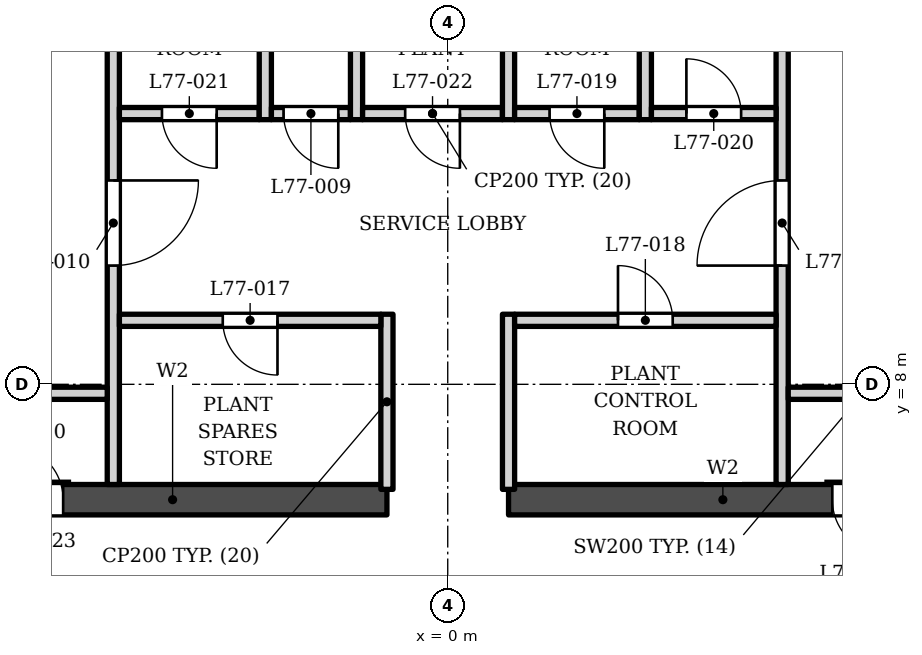
"""IFC4 building model, lengths in metres.
Left out: names, types, materials, properties, quantities, classifications, styles, units other than length and angle.
Written with IfcOpenShell. Run it as: python <this file> out.ifc"""

import sys

from ifc_helpers import new_model, si_unit, direction, frame, frame_2d, origin, place, context, subcontext, project, spatial, rectangle, extrude, element, fill, save


model = new_model("IFC4")
c1 = context("Model", 3, precision=1e-05, world=origin(), true_north=direction((0.0, 1.0)))
c2 = subcontext(c1, "Body", "Model", "MODEL_VIEW")
j1 = project(units=[si_unit("LENGTHUNIT", "METRE"), si_unit("PLANEANGLEUNIT", "RADIAN")], contexts=[c1])
p1 = place(None, origin())
s1 = spatial("IfcSite", under=j1, at=p1, CompositionType="ELEMENT")
p2 = place(p1, origin())
s2 = spatial("IfcBuilding", under=s1, at=p2, CompositionType="ELEMENT")
p3 = place(p2, frame((0.0, 0.0, 330.5)))
s3 = spatial("IfcBuildingStorey", under=s2, at=p3, CompositionType="ELEMENT", Elevation=330.5)
p4 = place(p3, frame((-8.05, 6.103, 0.0), z_axis=(0.0, 0.0, 1.0), x_axis=(1.0, 0.0, 0.0)))
e1 = element("IfcWall", 1, at=p4, inside=s3, PredefinedType="SHEAR", context=c2, shape_type="SweptSolid", body=[
    extrude(rectangle(XDim=7.05, YDim=0.5, at=frame_2d((3.525, 0.0))), origin(), (0.0, 0.0, 1.0), 5.0),
])
p5 = place(p4, frame((0.825, 0.0, 0.0)))
e2 = element("IfcOpeningElement", 2, at=p5, cuts=e1, PredefinedType="OPENING", context=c2, shape_type="SweptSolid", body=[
    extrude(rectangle(XDim=0.9, YDim=2.1, at=frame_2d((0.45, 1.05))), frame((0.0, 0.26, 0.0), z_axis=(0.0, -1.0, 0.0), x_axis=(1.0, 0.0, 0.0)), (0.0, 0.0, 1.0), 0.52),
])
p6 = place(p3, frame((1.0, 6.103, 0.0), z_axis=(0.0, 0.0, 1.0), x_axis=(1.0, 0.0, 0.0)))
e3 = element("IfcWall", 3, at=p6, inside=s3, PredefinedType="SHEAR", context=c2, shape_type="SweptSolid", body=[
    extrude(rectangle(XDim=7.05, YDim=0.5, at=frame_2d((3.525, 0.0))), origin(), (0.0, 0.0, 1.0), 5.0),
])
p7 = place(p6, frame((5.325, 0.0, 0.0)))
e4 = element("IfcOpeningElement", 4, at=p7, cuts=e3, PredefinedType="OPENING", context=c2, shape_type="SweptSolid", body=[
    extrude(rectangle(XDim=0.9, YDim=2.1, at=frame_2d((0.45, 1.05))), frame((0.0, 0.26, 0.0), z_axis=(0.0, -1.0, 0.0), x_axis=(1.0, 0.0, 0.0)), (0.0, 0.0, 1.0), 0.52),
])
for number, where, z_axis, x_axis in (
    (5, (-1.0, 6.273, 0.0), (0.0, 0.0, 1.0), (0.0, 1.0, 0.0)),
    (6, (1.0, 6.273, 0.0), (0.0, 0.0, 1.0), (0.0, 1.0, 0.0)),
):
    element("IfcWall", number, at=place(p3, frame(where, z_axis=z_axis, x_axis=x_axis)), inside=s3, PredefinedType="PARTITIONING", context=c2, shape_type="SweptSolid", body=[
        extrude(rectangle(XDim=2.88, YDim=0.2, at=frame_2d((1.44, 0.0))), origin(), (0.0, 0.0, 1.0), 4.8),
    ])
p8 = place(p3, frame((-5.5, 6.353, 0.0), z_axis=(0.0, 0.0, 1.0), x_axis=(0.0, 1.0, 0.0)))
e7 = element("IfcWall", 7, at=p8, inside=s3, PredefinedType="SOLIDWALL", context=c2, shape_type="SweptSolid", body=[
    extrude(rectangle(XDim=7.85, YDim=0.2, at=frame_2d((3.925, 0.0))), origin(), (0.0, 0.0, 1.0), 4.8),
])
p9 = place(p8, frame((3.6, 0.0, 0.0)))
e8 = element("IfcOpeningElement", 8, at=p9, cuts=e7, PredefinedType="OPENING", context=c2, shape_type="SweptSolid", body=[
    extrude(rectangle(XDim=1.4, YDim=2.1, at=frame_2d((0.7, 1.05))), frame((0.0, 0.11, 0.0), z_axis=(0.0, -1.0, 0.0), x_axis=(1.0, 0.0, 0.0)), (0.0, 0.0, 1.0), 0.22),
])
p10 = place(p3, frame((5.5, 6.353, 0.0), z_axis=(0.0, 0.0, 1.0), x_axis=(0.0, 1.0, 0.0)))
e9 = element("IfcWall", 9, at=p10, inside=s3, PredefinedType="SOLIDWALL", context=c2, shape_type="SweptSolid", body=[
    extrude(rectangle(XDim=7.85, YDim=0.2, at=frame_2d((3.925, 0.0))), origin(), (0.0, 0.0, 1.0), 4.8),
])
p11 = place(p10, frame((3.6, 0.0, 0.0)))
e10 = element("IfcOpeningElement", 10, at=p11, cuts=e9, PredefinedType="OPENING", context=c2, shape_type="SweptSolid", body=[
    extrude(rectangle(XDim=1.4, YDim=2.1, at=frame_2d((0.7, 1.05))), frame((0.0, 0.11, 0.0), z_axis=(0.0, -1.0, 0.0), x_axis=(1.0, 0.0, 0.0)), (0.0, 0.0, 1.0), 0.22),
])
for number, where, z_axis, x_axis in (
    (11, (-8.05, 7.853, 0.0), (0.0, 0.0, 1.0), (1.0, 0.0, 0.0)),
    (12, (5.6, 7.853, 0.0), (0.0, 0.0, 1.0), (1.0, 0.0, 0.0)),
):
    element("IfcWall", number, at=place(p3, frame(where, z_axis=z_axis, x_axis=x_axis)), inside=s3, PredefinedType="SOLIDWALL", context=c2, shape_type="SweptSolid", body=[
        extrude(rectangle(XDim=2.45, YDim=0.2, at=frame_2d((1.225, 0.0))), origin(), (0.0, 0.0, 1.0), 4.8),
    ])
p12 = place(p3, frame((-5.4, 9.052, 0.0), z_axis=(0.0, 0.0, 1.0), x_axis=(1.0, 0.0, 0.0)))
e13 = element("IfcWall", 13, at=p12, inside=s3, PredefinedType="PARTITIONING", context=c2, shape_type="SweptSolid", body=[
    extrude(rectangle(XDim=4.3, YDim=0.2, at=frame_2d((2.15, 0.0))), origin(), (0.0, 0.0, 1.0), 4.8),
])
p13 = place(p12, frame((1.7, 0.0, 0.0)))
e14 = element("IfcOpeningElement", 14, at=p13, cuts=e13, PredefinedType="OPENING", context=c2, shape_type="SweptSolid", body=[
    extrude(rectangle(XDim=0.9, YDim=2.1, at=frame_2d((0.45, 1.05))), frame((0.0, 0.11, 0.0), z_axis=(0.0, -1.0, 0.0), x_axis=(1.0, 0.0, 0.0)), (0.0, 0.0, 1.0), 0.22),
])
p14 = place(p3, frame((1.1, 9.052, 0.0), z_axis=(0.0, 0.0, 1.0), x_axis=(1.0, 0.0, 0.0)))
e15 = element("IfcWall", 15, at=p14, inside=s3, PredefinedType="PARTITIONING", context=c2, shape_type="SweptSolid", body=[
    extrude(rectangle(XDim=4.3, YDim=0.2, at=frame_2d((2.15, 0.0))), origin(), (0.0, 0.0, 1.0), 4.8),
])
p15 = place(p14, frame((1.7, 0.0, 0.0)))
e16 = element("IfcOpeningElement", 16, at=p15, cuts=e15, PredefinedType="OPENING", context=c2, shape_type="SweptSolid", body=[
    extrude(rectangle(XDim=0.9, YDim=2.1, at=frame_2d((0.45, 1.05))), frame((0.0, 0.11, 0.0), z_axis=(0.0, -1.0, 0.0), x_axis=(1.0, 0.0, 0.0)), (0.0, 0.0, 1.0), 0.22),
])
p16 = place(p3, frame((-5.4, 12.453, 0.0), z_axis=(0.0, 0.0, 1.0), x_axis=(1.0, 0.0, 0.0)))
e17 = element("IfcWall", 17, at=p16, inside=s3, PredefinedType="PARTITIONING", context=c2, shape_type="SweptSolid", body=[
    extrude(rectangle(XDim=2.3, YDim=0.2, at=frame_2d((1.15, 0.0))), origin(), (0.0, 0.0, 1.0), 4.8),
])
p17 = place(p16, frame((0.7, 0.0, 0.0)))
e18 = element("IfcOpeningElement", 18, at=p17, cuts=e17, PredefinedType="OPENING", context=c2, shape_type="SweptSolid", body=[
    extrude(rectangle(XDim=0.9, YDim=2.1, at=frame_2d((0.45, 1.05))), frame((0.0, 0.11, 0.0), z_axis=(0.0, -1.0, 0.0), x_axis=(1.0, 0.0, 0.0)), (0.0, 0.0, 1.0), 0.22),
])
p18 = place(p3, frame((-3.0, 12.353, 0.0), z_axis=(0.0, 0.0, 1.0), x_axis=(0.0, 1.0, 0.0)))
e19 = element("IfcWall", 19, at=p18, inside=s3, PredefinedType="PARTITIONING", context=c2, shape_type="SweptSolid", body=[
    extrude(rectangle(XDim=3.2, YDim=0.2, at=frame_2d((1.6, 0.0))), origin(), (0.0, 0.0, 1.0), 4.8),
])
p19 = place(p3, frame((-2.9, 12.453, 0.0), z_axis=(0.0, 0.0, 1.0), x_axis=(1.0, 0.0, 0.0)))
e20 = element("IfcWall", 20, at=p19, inside=s3, PredefinedType="PARTITIONING", context=c2, shape_type="SweptSolid", body=[
    extrude(rectangle(XDim=1.3, YDim=0.2, at=frame_2d((0.65, 0.0))), origin(), (0.0, 0.0, 1.0), 4.8),
])
p20 = place(p19, frame((0.2, 0.0, 0.0)))
e21 = element("IfcOpeningElement", 21, at=p20, cuts=e20, PredefinedType="OPENING", context=c2, shape_type="SweptSolid", body=[
    extrude(rectangle(XDim=0.9, YDim=2.1, at=frame_2d((0.45, 1.05))), frame((0.0, 0.11, 0.0), z_axis=(0.0, -1.0, 0.0), x_axis=(1.0, 0.0, 0.0)), (0.0, 0.0, 1.0), 0.22),
])
p21 = place(p3, frame((-1.5, 12.353, 0.0), z_axis=(0.0, 0.0, 1.0), x_axis=(0.0, 1.0, 0.0)))
e22 = element("IfcWall", 22, at=p21, inside=s3, PredefinedType="PARTITIONING", context=c2, shape_type="SweptSolid", body=[
    extrude(rectangle(XDim=3.2, YDim=0.2, at=frame_2d((1.6, 0.0))), origin(), (0.0, 0.0, 1.0), 4.8),
])
p22 = place(p3, frame((-1.4, 12.453, 0.0), z_axis=(0.0, 0.0, 1.0), x_axis=(1.0, 0.0, 0.0)))
e23 = element("IfcWall", 23, at=p22, inside=s3, PredefinedType="PARTITIONING", context=c2, shape_type="SweptSolid", body=[
    extrude(rectangle(XDim=2.3, YDim=0.2, at=frame_2d((1.15, 0.0))), origin(), (0.0, 0.0, 1.0), 4.8),
])
p23 = place(p22, frame((0.7, 0.0, 0.0)))
e24 = element("IfcOpeningElement", 24, at=p23, cuts=e23, PredefinedType="OPENING", context=c2, shape_type="SweptSolid", body=[
    extrude(rectangle(XDim=0.9, YDim=2.1, at=frame_2d((0.45, 1.05))), frame((0.0, 0.11, 0.0), z_axis=(0.0, -1.0, 0.0), x_axis=(1.0, 0.0, 0.0)), (0.0, 0.0, 1.0), 0.22),
])
p24 = place(p3, frame((1.0, 12.353, 0.0), z_axis=(0.0, 0.0, 1.0), x_axis=(0.0, 1.0, 0.0)))
e25 = element("IfcWall", 25, at=p24, inside=s3, PredefinedType="PARTITIONING", context=c2, shape_type="SweptSolid", body=[
    extrude(rectangle(XDim=3.2, YDim=0.2, at=frame_2d((1.6, 0.0))), origin(), (0.0, 0.0, 1.0), 4.8),
])
p25 = place(p3, frame((1.1, 12.453, 0.0), z_axis=(0.0, 0.0, 1.0), x_axis=(1.0, 0.0, 0.0)))
e26 = element("IfcWall", 26, at=p25, inside=s3, PredefinedType="PARTITIONING", context=c2, shape_type="SweptSolid", body=[
    extrude(rectangle(XDim=2.05, YDim=0.2, at=frame_2d((1.025, 0.0))), origin(), (0.0, 0.0, 1.0), 4.8),
])
p26 = place(p25, frame((0.575, 0.0, 0.0)))
e27 = element("IfcOpeningElement", 27, at=p26, cuts=e26, PredefinedType="OPENING", context=c2, shape_type="SweptSolid", body=[
    extrude(rectangle(XDim=0.9, YDim=2.1, at=frame_2d((0.45, 1.05))), frame((0.0, 0.11, 0.0), z_axis=(0.0, -1.0, 0.0), x_axis=(1.0, 0.0, 0.0)), (0.0, 0.0, 1.0), 0.22),
])
p27 = place(p3, frame((3.25, 12.353, 0.0), z_axis=(0.0, 0.0, 1.0), x_axis=(0.0, 1.0, 0.0)))
e28 = element("IfcWall", 28, at=p27, inside=s3, PredefinedType="PARTITIONING", context=c2, shape_type="SweptSolid", body=[
    extrude(rectangle(XDim=3.2, YDim=0.2, at=frame_2d((1.6, 0.0))), origin(), (0.0, 0.0, 1.0), 4.8),
])
p28 = place(p3, frame((3.35, 12.453, 0.0), z_axis=(0.0, 0.0, 1.0), x_axis=(1.0, 0.0, 0.0)))
e29 = element("IfcWall", 29, at=p28, inside=s3, PredefinedType="PARTITIONING", context=c2, shape_type="SweptSolid", body=[
    extrude(rectangle(XDim=2.05, YDim=0.2, at=frame_2d((1.025, 0.0))), origin(), (0.0, 0.0, 1.0), 4.8),
])
p29 = place(p28, frame((0.575, 0.0, 0.0)))
e30 = element("IfcOpeningElement", 30, at=p29, cuts=e29, PredefinedType="OPENING", context=c2, shape_type="SweptSolid", body=[
    extrude(rectangle(XDim=0.9, YDim=2.1, at=frame_2d((0.45, 1.05))), frame((0.0, 0.11, 0.0), z_axis=(0.0, -1.0, 0.0), x_axis=(1.0, 0.0, 0.0)), (0.0, 0.0, 1.0), 0.22),
])
p30 = place(p20, origin())
e31 = element("IfcDoor", 31, at=p30, inside=s3, OperationType="SINGLE_SWING_RIGHT", PredefinedType="DOOR", context=c2, shape_type="SweptSolid", body=[
    extrude(rectangle(XDim=0.9, YDim=2.1, at=frame_2d((0.45, 1.05))), frame((0.0, 0.025, 0.0), z_axis=(0.0, -1.0, 0.0), x_axis=(1.0, 0.0, 0.0)), (0.0, 0.0, 1.0), 0.05),
])
fill(e21, e31)
p31 = place(p9, origin())
e32 = element("IfcDoor", 32, at=p31, inside=s3, OperationType="SINGLE_SWING_RIGHT", PredefinedType="DOOR", context=c2, shape_type="SweptSolid", body=[
    extrude(rectangle(XDim=1.4, YDim=2.1, at=frame_2d((0.7, 1.05))), frame((0.0, 0.025, 0.0), z_axis=(0.0, -1.0, 0.0), x_axis=(1.0, 0.0, 0.0)), (0.0, 0.0, 1.0), 0.05),
])
fill(e8, e32)
p32 = place(p11, origin())
e33 = element("IfcDoor", 33, at=p32, inside=s3, OperationType="SINGLE_SWING_LEFT", PredefinedType="DOOR", context=c2, shape_type="SweptSolid", body=[
    extrude(rectangle(XDim=1.4, YDim=2.1, at=frame_2d((0.7, 1.05))), frame((0.0, 0.025, 0.0), z_axis=(0.0, -1.0, 0.0), x_axis=(1.0, 0.0, 0.0)), (0.0, 0.0, 1.0), 0.05),
])
fill(e10, e33)
p33 = place(p13, origin())
e34 = element("IfcDoor", 34, at=p33, inside=s3, OperationType="SINGLE_SWING_RIGHT", PredefinedType="DOOR", context=c2, shape_type="SweptSolid", body=[
    extrude(rectangle(XDim=0.9, YDim=2.1, at=frame_2d((0.45, 1.05))), frame((0.0, 0.025, 0.0), z_axis=(0.0, -1.0, 0.0), x_axis=(1.0, 0.0, 0.0)), (0.0, 0.0, 1.0), 0.05),
])
fill(e14, e34)
p34 = place(p15, origin())
e35 = element("IfcDoor", 35, at=p34, inside=s3, OperationType="SINGLE_SWING_LEFT", PredefinedType="DOOR", context=c2, shape_type="SweptSolid", body=[
    extrude(rectangle(XDim=0.9, YDim=2.1, at=frame_2d((0.45, 1.05))), frame((0.0, 0.025, 0.0), z_axis=(0.0, -1.0, 0.0), x_axis=(1.0, 0.0, 0.0)), (0.0, 0.0, 1.0), 0.05),
])
fill(e16, e35)
p35 = place(p26, origin())
e36 = element("IfcDoor", 36, at=p35, inside=s3, OperationType="SINGLE_SWING_RIGHT", PredefinedType="DOOR", context=c2, shape_type="SweptSolid", body=[
    extrude(rectangle(XDim=0.9, YDim=2.1, at=frame_2d((0.45, 1.05))), frame((0.0, 0.025, 0.0), z_axis=(0.0, -1.0, 0.0), x_axis=(1.0, 0.0, 0.0)), (0.0, 0.0, 1.0), 0.05),
])
fill(e27, e36)
p36 = place(p29, origin())
e37 = element("IfcDoor", 37, at=p36, inside=s3, OperationType="SINGLE_SWING_LEFT", PredefinedType="DOOR", context=c2, shape_type="SweptSolid", body=[
    extrude(rectangle(XDim=0.9, YDim=2.1, at=frame_2d((0.45, 1.05))), frame((0.0, 0.025, 0.0), z_axis=(0.0, -1.0, 0.0), x_axis=(1.0, 0.0, 0.0)), (0.0, 0.0, 1.0), 0.05),
])
fill(e30, e37)
p37 = place(p17, origin())
e38 = element("IfcDoor", 38, at=p37, inside=s3, OperationType="SINGLE_SWING_RIGHT", PredefinedType="DOOR", context=c2, shape_type="SweptSolid", body=[
    extrude(rectangle(XDim=0.9, YDim=2.1, at=frame_2d((0.45, 1.05))), frame((0.0, 0.025, 0.0), z_axis=(0.0, -1.0, 0.0), x_axis=(1.0, 0.0, 0.0)), (0.0, 0.0, 1.0), 0.05),
])
fill(e18, e38)
p38 = place(p23, origin())
e39 = element("IfcDoor", 39, at=p38, inside=s3, OperationType="SINGLE_SWING_RIGHT", PredefinedType="DOOR", context=c2, shape_type="SweptSolid", body=[
    extrude(rectangle(XDim=0.9, YDim=2.1, at=frame_2d((0.45, 1.05))), frame((0.0, 0.025, 0.0), z_axis=(0.0, -1.0, 0.0), x_axis=(1.0, 0.0, 0.0)), (0.0, 0.0, 1.0), 0.05),
])
fill(e24, e39)
p39 = place(p5, origin())
e40 = element("IfcDoor", 40, at=p39, inside=s3, OperationType="SINGLE_SWING_LEFT", PredefinedType="DOOR", context=c2, shape_type="SweptSolid", body=[
    extrude(rectangle(XDim=0.9, YDim=2.1, at=frame_2d((0.45, 1.05))), frame((0.0, 0.025, 0.0), z_axis=(0.0, -1.0, 0.0), x_axis=(1.0, 0.0, 0.0)), (0.0, 0.0, 1.0), 0.05),
])
fill(e2, e40)
p40 = place(p7, origin())
e41 = element("IfcDoor", 41, at=p40, inside=s3, OperationType="SINGLE_SWING_RIGHT", PredefinedType="DOOR", context=c2, shape_type="SweptSolid", body=[
    extrude(rectangle(XDim=0.9, YDim=2.1, at=frame_2d((0.45, 1.05))), frame((0.0, 0.025, 0.0), z_axis=(0.0, -1.0, 0.0), x_axis=(1.0, 0.0, 0.0)), (0.0, 0.0, 1.0), 0.05),
])
fill(e4, e41)
save(model, sys.argv[1])
